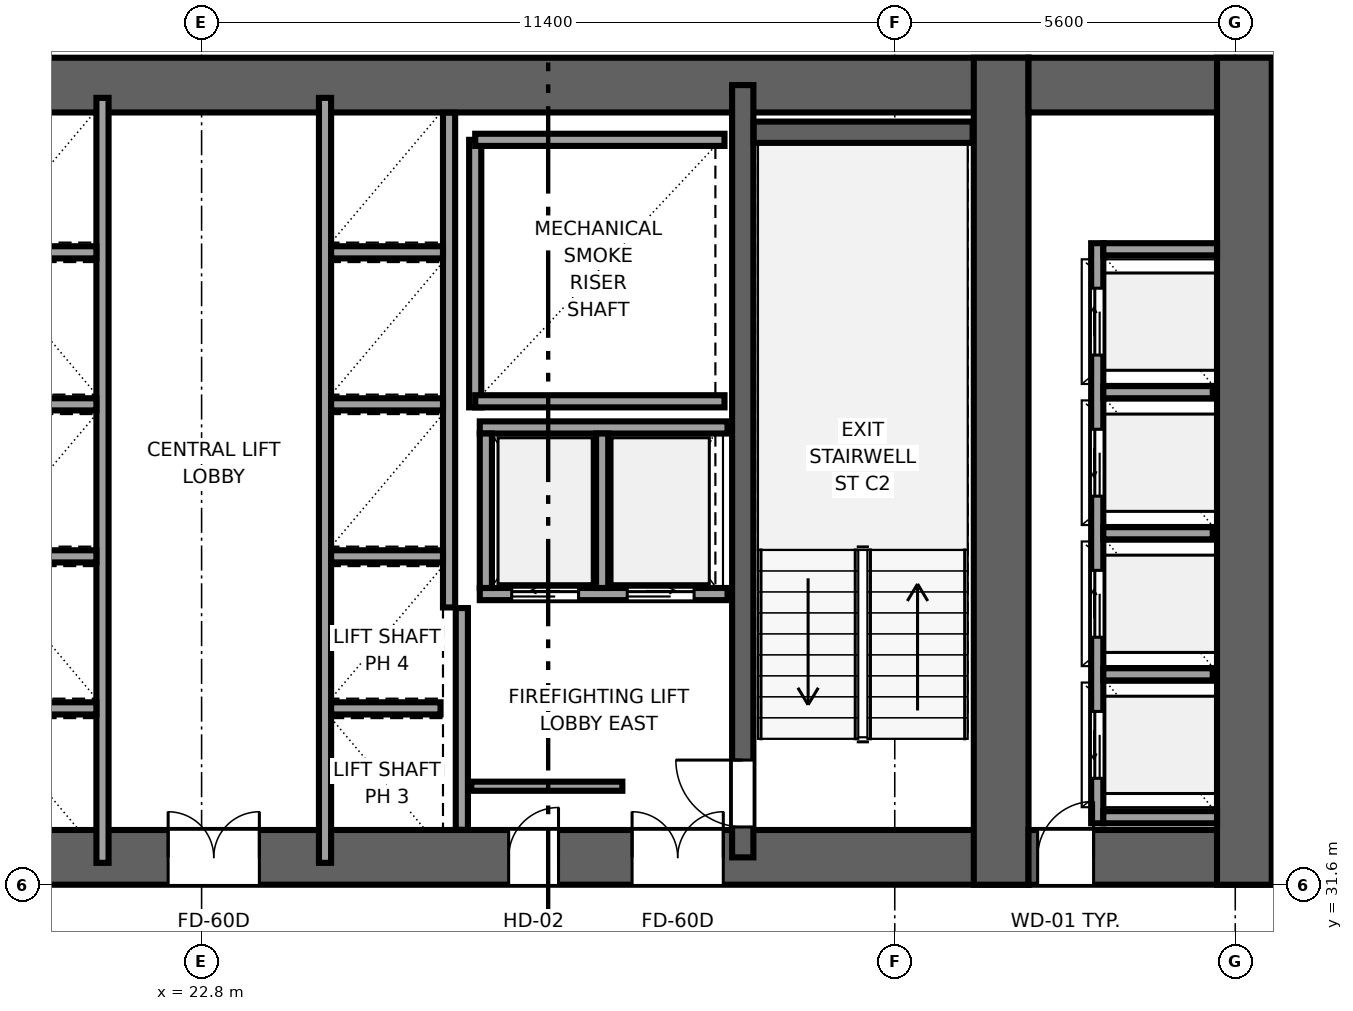
"""IFC4 building model, lengths in metres.
Left out: names, types, materials, properties, quantities, classifications, styles, units other than length and angle.
Written with IfcOpenShell. Run it as: python <this file> out.ifc"""

import sys

from ifc_helpers import new_model, si_unit, direction, frame, frame_2d, origin, place, context, subcontext, project, spatial, rectangle, extrude, source, transform, mapped, element, fill, save


model = new_model("IFC4")
c1 = context("Model", 3, precision=1e-05, world=origin(), true_north=direction((0.0, 1.0)))
c2 = subcontext(c1, "Body", "Model", "MODEL_VIEW")
j1 = project(units=[si_unit("LENGTHUNIT", "METRE"), si_unit("PLANEANGLEUNIT", "RADIAN")], contexts=[c1])
p1 = place(None, origin())
s1 = spatial("IfcSite", under=j1, at=p1, CompositionType="ELEMENT")
p2 = place(p1, origin())
s2 = spatial("IfcBuilding", under=s1, at=p2, CompositionType="ELEMENT")
p3 = place(p2, frame((0.0, 0.0, 71.05)))
s3 = spatial("IfcBuildingStorey", under=s2, at=p3, CompositionType="ELEMENT", Elevation=71.05)
p4 = place(p3, frame((9.6, 32.05, 0.0), z_axis=(0.0, 0.0, 1.0), x_axis=(1.0, 0.0, 0.0)))
e1 = element("IfcWall", 1, at=p4, inside=s3, PredefinedType="SHEAR", context=c2, shape_type="SweptSolid", body=[
    extrude(rectangle(XDim=26.8, YDim=0.9, at=frame_2d((13.4, 0.0))), origin(), (0.0, 0.0, 1.0), 3.55),
])
p5 = place(p4, frame((6.52, 0.0, 0.0), z_axis=(0.0, 0.0, 1.0), x_axis=(-1.0, 0.0, 0.0)))
e2 = element("IfcOpeningElement", 2, at=p5, cuts=e1, PredefinedType="OPENING", context=c2, shape_type="SweptSolid", body=[
    extrude(rectangle(XDim=1.5, YDim=2.04, at=frame_2d((0.75, 1.02))), frame((0.0, 0.46, 0.0), z_axis=(0.0, -1.0, 0.0), x_axis=(1.0, 0.0, 0.0)), (0.0, 0.0, 1.0), 0.92),
])
p6 = place(p4, frame((14.15, 0.0, 0.0), z_axis=(0.0, 0.0, 1.0), x_axis=(-1.0, 0.0, 0.0)))
e3 = element("IfcOpeningElement", 3, at=p6, cuts=e1, PredefinedType="OPENING", context=c2, shape_type="SweptSolid", body=[
    extrude(rectangle(XDim=1.5, YDim=2.04, at=frame_2d((0.75, 1.02))), frame((0.0, 0.46, 0.0), z_axis=(0.0, -1.0, 0.0), x_axis=(1.0, 0.0, 0.0)), (0.0, 0.0, 1.0), 0.92),
])
p7 = place(p4, frame((21.78, 0.0, 0.0), z_axis=(0.0, 0.0, 1.0), x_axis=(-1.0, 0.0, 0.0)))
e4 = element("IfcOpeningElement", 4, at=p7, cuts=e1, PredefinedType="OPENING", context=c2, shape_type="SweptSolid", body=[
    extrude(rectangle(XDim=1.5, YDim=2.04, at=frame_2d((0.75, 1.02))), frame((0.0, 0.46, 0.0), z_axis=(0.0, -1.0, 0.0), x_axis=(1.0, 0.0, 0.0)), (0.0, 0.0, 1.0), 0.92),
])
p8 = place(p4, frame((8.57, 0.0, 0.0), z_axis=(0.0, 0.0, 1.0), x_axis=(-1.0, 0.0, 0.0)))
e5 = element("IfcOpeningElement", 5, at=p8, cuts=e1, PredefinedType="OPENING", context=c2, shape_type="SweptSolid", body=[
    extrude(rectangle(XDim=0.82, YDim=2.01, at=frame_2d((0.41, 1.005))), frame((0.0, 0.46, 0.0), z_axis=(0.0, -1.0, 0.0), x_axis=(1.0, 0.0, 0.0)), (0.0, 0.0, 1.0), 0.92),
])
p9 = place(p4, frame((19.07, 0.0, 0.0), z_axis=(0.0, 0.0, 1.0), x_axis=(-1.0, 0.0, 0.0)))
e6 = element("IfcOpeningElement", 6, at=p9, cuts=e1, PredefinedType="OPENING", context=c2, shape_type="SweptSolid", body=[
    extrude(rectangle(XDim=0.82, YDim=2.01, at=frame_2d((0.41, 1.005))), frame((0.0, 0.46, 0.0), z_axis=(0.0, -1.0, 0.0), x_axis=(1.0, 0.0, 0.0)), (0.0, 0.0, 1.0), 0.92),
])
p10 = place(p3, frame((9.6, 44.75, 0.0), z_axis=(0.0, 0.0, 1.0), x_axis=(1.0, 0.0, 0.0)))
e7 = element("IfcWall", 7, at=p10, inside=s3, PredefinedType="SHEAR", context=c2, shape_type="SweptSolid", body=[
    extrude(rectangle(XDim=26.8, YDim=0.9, at=frame_2d((13.4, 0.0))), origin(), (0.0, 0.0, 1.0), 3.55),
])
p11 = place(p3, frame((35.95, 31.6, 0.0), z_axis=(0.0, 0.0, 1.0), x_axis=(0.0, 1.0, 0.0)))
e8 = element("IfcWall", 8, at=p11, inside=s3, PredefinedType="SHEAR", context=c2, shape_type="SweptSolid", body=[
    extrude(rectangle(XDim=13.6, YDim=0.9, at=frame_2d((6.8, 0.0))), origin(), (0.0, 0.0, 1.0), 3.55),
])
p12 = place(p3, frame((31.7, 32.05, 0.0), z_axis=(0.0, 0.0, 1.0), x_axis=(0.0, 1.0, 0.0)))
e9 = element("IfcWall", 9, at=p12, inside=s3, PredefinedType="SHEAR", context=c2, shape_type="SweptSolid", body=[
    extrude(rectangle(XDim=12.7, YDim=0.35, at=frame_2d((6.35, 0.0))), origin(), (0.0, 0.0, 1.0), 3.55),
])
p13 = place(p12, frame((1.6, 0.0, 0.0), z_axis=(0.0, 0.0, 1.0), x_axis=(-1.0, 0.0, 0.0)))
e10 = element("IfcOpeningElement", 10, at=p13, cuts=e9, PredefinedType="OPENING", context=c2, shape_type="SweptSolid", body=[
    extrude(rectangle(XDim=1.1, YDim=2.12, at=frame_2d((0.55, 1.06))), frame((0.0, 0.185, 0.0), z_axis=(0.0, -1.0, 0.0), x_axis=(1.0, 0.0, 0.0)), (0.0, 0.0, 1.0), 0.37),
])
p14 = place(p3, frame((36.4, 32.05, 0.0), z_axis=(0.0, 0.0, 1.0), x_axis=(1.0, 0.0, 0.0)))
e11 = element("IfcWall", 11, at=p14, inside=s3, PredefinedType="SHEAR", context=c2, shape_type="SweptSolid", body=[
    extrude(rectangle(XDim=4.0, YDim=0.9, at=frame_2d((2.0, 0.0))), origin(), (0.0, 0.0, 1.0), 3.55),
])
p15 = place(p14, frame((1.07, 0.0, 0.0), z_axis=(0.0, 0.0, 1.0), x_axis=(-1.0, 0.0, 0.0)))
e12 = element("IfcOpeningElement", 12, at=p15, cuts=e11, PredefinedType="OPENING", context=c2, shape_type="SweptSolid", body=[
    extrude(rectangle(XDim=0.92, YDim=2.01, at=frame_2d((0.46, 1.005))), frame((0.0, 0.46, 0.0), z_axis=(0.0, -1.0, 0.0), x_axis=(1.0, 0.0, 0.0)), (0.0, 0.0, 1.0), 0.92),
])
p16 = place(p3, frame((36.4, 44.75, 0.0), z_axis=(0.0, 0.0, 1.0), x_axis=(1.0, 0.0, 0.0)))
e13 = element("IfcWall", 13, at=p16, inside=s3, PredefinedType="SHEAR", context=c2, shape_type="SweptSolid", body=[
    extrude(rectangle(XDim=4.0, YDim=0.9, at=frame_2d((2.0, 0.0))), origin(), (0.0, 0.0, 1.0), 3.55),
])
p17 = place(p3, frame((39.95, 31.6, 0.0), z_axis=(0.0, 0.0, 1.0), x_axis=(0.0, 1.0, 0.0)))
e14 = element("IfcWall", 14, at=p17, inside=s3, PredefinedType="SHEAR", context=c2, shape_type="SweptSolid", body=[
    extrude(rectangle(XDim=13.6, YDim=0.9, at=frame_2d((6.8, 0.0))), origin(), (0.0, 0.0, 1.0), 3.55),
])
p18 = place(p3, frame((31.88, 43.975, 0.0), z_axis=(0.0, 0.0, 1.0), x_axis=(1.0, 0.0, 0.0)))
e15 = element("IfcWall", 15, at=p18, inside=s3, PredefinedType="SHEAR", context=c2, shape_type="SweptSolid", body=[
    extrude(rectangle(XDim=3.6, YDim=0.35, at=frame_2d((1.8, 0.0))), origin(), (0.0, 0.0, 1.0), 3.55),
])
p19 = place(p3, frame((27.3, 39.45, 0.0), z_axis=(0.0, 0.0, 1.0), x_axis=(0.0, 1.0, 0.0)))
e16 = element("IfcWall", 16, at=p19, inside=s3, PredefinedType="SOLIDWALL", context=c2, shape_type="SweptSolid", body=[
    extrude(rectangle(XDim=4.4, YDim=0.2, at=frame_2d((2.2, 0.0))), origin(), (0.0, 0.0, 1.0), 3.37),
])
for number, where, z_axis, x_axis in (
    (17, (27.3, 39.55, 0.0), (0.0, 0.0, 1.0), (1.0, 0.0, 0.0)),
    (18, (27.3, 43.85, 0.0), (0.0, 0.0, 1.0), (1.0, 0.0, 0.0)),
):
    element("IfcWall", number, at=place(p3, frame(where, z_axis=z_axis, x_axis=x_axis)), inside=s3, PredefinedType="SOLIDWALL", context=c2, shape_type="SweptSolid", body=[
        extrude(rectangle(XDim=4.1, YDim=0.2, at=frame_2d((2.05, 0.0))), origin(), (0.0, 0.0, 1.0), 3.37),
    ])
p20 = place(p3, frame((27.08, 32.504, 0.0), z_axis=(0.0, 0.0, 1.0), x_axis=(0.0, 1.0, 0.0)))
e19 = element("IfcWall", 19, at=p20, inside=s3, PredefinedType="SOLIDWALL", context=c2, shape_type="SweptSolid", body=[
    extrude(rectangle(XDim=3.646, YDim=0.2, at=frame_2d((1.823, 0.0))), origin(), (0.0, 0.0, 1.0), 3.37),
])
p21 = place(p3, frame((21.17, 31.96, 0.0), z_axis=(0.0, 0.0, 1.0), x_axis=(0.0, 1.0, 0.0)))
e20 = element("IfcWall", 20, at=p21, inside=s3, PredefinedType="SOLIDWALL", context=c2, shape_type="SweptSolid", body=[
    extrude(rectangle(XDim=12.58, YDim=0.2, at=frame_2d((6.29, 0.0))), origin(), (0.0, 0.0, 1.0), 3.37),
])
p22 = place(p3, frame((19.27, 34.5, 0.0), z_axis=(0.0, 0.0, 1.0), x_axis=(1.0, 0.0, 0.0)))
e21 = element("IfcWall", 21, at=p22, inside=s3, PredefinedType="SOLIDWALL", context=c2, shape_type="SweptSolid", body=[
    extrude(rectangle(XDim=1.8, YDim=0.2, at=frame_2d((0.9, 0.0))), origin(), (0.0, 0.0, 1.0), 3.37),
])
for number, where, z_axis, x_axis in (
    (22, (19.23, 37.0, 0.0), (0.0, 0.0, 1.0), (1.0, 0.0, 0.0)),
    (23, (19.23, 39.5, 0.0), (0.0, 0.0, 1.0), (1.0, 0.0, 0.0)),
    (24, (19.23, 42.0, 0.0), (0.0, 0.0, 1.0), (1.0, 0.0, 0.0)),
):
    element("IfcWall", number, at=place(p3, frame(where, z_axis=z_axis, x_axis=x_axis)), inside=s3, PredefinedType="SOLIDWALL", context=c2, shape_type="SweptSolid", body=[
        extrude(rectangle(XDim=1.84, YDim=0.2, at=frame_2d((0.92, 0.0))), origin(), (0.0, 0.0, 1.0), 3.37),
    ])
p23 = place(p3, frame((27.375, 36.38, 0.0), z_axis=(0.0, 0.0, 1.0), x_axis=(1.0, 0.0, 0.0)))
e25 = element("IfcWall", 25, at=p23, inside=s3, PredefinedType="SOLIDWALL", context=c2, shape_type="SweptSolid", body=[
    extrude(rectangle(XDim=4.075, YDim=0.2, at=frame_2d((2.038, 0.0))), origin(), (0.0, 0.0, 1.0), 3.37),
])
p24 = place(p23, frame((0.525, 0.0, 0.0)))
e26 = element("IfcOpeningElement", 26, at=p24, cuts=e25, PredefinedType="OPENING", context=c2, shape_type="SweptSolid", body=[
    extrude(rectangle(XDim=1.1, YDim=2.12, at=frame_2d((0.55, 1.06))), frame((0.0, 0.11, 0.0), z_axis=(0.0, -1.0, 0.0), x_axis=(1.0, 0.0, 0.0)), (0.0, 0.0, 1.0), 0.22),
])
p25 = place(p23, frame((2.425, 0.0, 0.0)))
e27 = element("IfcOpeningElement", 27, at=p25, cuts=e25, PredefinedType="OPENING", context=c2, shape_type="SweptSolid", body=[
    extrude(rectangle(XDim=1.1, YDim=2.12, at=frame_2d((0.55, 1.06))), frame((0.0, 0.11, 0.0), z_axis=(0.0, -1.0, 0.0), x_axis=(1.0, 0.0, 0.0)), (0.0, 0.0, 1.0), 0.22),
])
p26 = place(p3, frame((27.375, 39.12, 0.0), z_axis=(0.0, 0.0, 1.0), x_axis=(1.0, 0.0, 0.0)))
e28 = element("IfcWall", 28, at=p26, inside=s3, PredefinedType="SOLIDWALL", context=c2, shape_type="SweptSolid", body=[
    extrude(rectangle(XDim=4.075, YDim=0.2, at=frame_2d((2.038, 0.0))), origin(), (0.0, 0.0, 1.0), 3.37),
])
for number, where, z_axis, x_axis in (
    (29, (27.475, 36.48, 0.0), (0.0, 0.0, 1.0), (0.0, 1.0, 0.0)),
    (30, (29.387, 36.48, 0.0), (0.0, 0.0, 1.0), (0.0, 1.0, 0.0)),
):
    element("IfcWall", number, at=place(p3, frame(where, z_axis=z_axis, x_axis=x_axis)), inside=s3, PredefinedType="SOLIDWALL", context=c2, shape_type="SweptSolid", body=[
        extrude(rectangle(XDim=2.54, YDim=0.2, at=frame_2d((1.27, 0.0))), origin(), (0.0, 0.0, 1.0), 3.37),
    ])
p27 = place(p3, frame((24.83, 31.96, 0.0), z_axis=(0.0, 0.0, 1.0), x_axis=(0.0, 1.0, 0.0)))
e31 = element("IfcWall", 31, at=p27, inside=s3, PredefinedType="SOLIDWALL", context=c2, shape_type="SweptSolid", body=[
    extrude(rectangle(XDim=12.58, YDim=0.2, at=frame_2d((6.29, 0.0))), origin(), (0.0, 0.0, 1.0), 3.37),
])
p28 = place(p3, frame((26.87, 36.16, 0.0), z_axis=(0.0, 0.0, 1.0), x_axis=(0.0, 1.0, 0.0)))
e32 = element("IfcWall", 32, at=p28, inside=s3, PredefinedType="SOLIDWALL", context=c2, shape_type="SweptSolid", body=[
    extrude(rectangle(XDim=8.136, YDim=0.2, at=frame_2d((4.068, 0.0))), origin(), (0.0, 0.0, 1.0), 3.37),
])
p29 = place(p3, frame((24.93, 34.5, 0.0), z_axis=(0.0, 0.0, 1.0), x_axis=(1.0, 0.0, 0.0)))
e33 = element("IfcWall", 33, at=p29, inside=s3, PredefinedType="SOLIDWALL", context=c2, shape_type="SweptSolid", body=[
    extrude(rectangle(XDim=1.8, YDim=0.2, at=frame_2d((0.9, 0.0))), origin(), (0.0, 0.0, 1.0), 3.37),
])
for number, where, z_axis, x_axis in (
    (34, (24.93, 37.0, 0.0), (0.0, 0.0, 1.0), (1.0, 0.0, 0.0)),
    (35, (24.93, 39.5, 0.0), (0.0, 0.0, 1.0), (1.0, 0.0, 0.0)),
    (36, (24.93, 42.0, 0.0), (0.0, 0.0, 1.0), (1.0, 0.0, 0.0)),
):
    element("IfcWall", number, at=place(p3, frame(where, z_axis=z_axis, x_axis=x_axis)), inside=s3, PredefinedType="SOLIDWALL", context=c2, shape_type="SweptSolid", body=[
        extrude(rectangle(XDim=1.84, YDim=0.2, at=frame_2d((0.92, 0.0))), origin(), (0.0, 0.0, 1.0), 3.37),
    ])
p30 = place(p3, frame((37.53, 32.61, 0.0), z_axis=(0.0, 0.0, 1.0), x_axis=(0.0, 1.0, 0.0)))
e37 = element("IfcWall", 37, at=p30, inside=s3, PredefinedType="SOLIDWALL", context=c2, shape_type="SweptSolid", body=[
    extrude(rectangle(XDim=9.54, YDim=0.2, at=frame_2d((4.77, 0.0))), origin(), (0.0, 0.0, 1.0), 3.37),
])
p31 = place(p30, frame((0.74, 0.0, 0.0)))
e38 = element("IfcOpeningElement", 38, at=p31, cuts=e37, PredefinedType="OPENING", context=c2, shape_type="SweptSolid", body=[
    extrude(rectangle(XDim=1.1, YDim=2.12, at=frame_2d((0.55, 1.06))), frame((0.0, 0.11, 0.0), z_axis=(0.0, -1.0, 0.0), x_axis=(1.0, 0.0, 0.0)), (0.0, 0.0, 1.0), 0.22),
])
p32 = place(p30, frame((3.06, 0.0, 0.0)))
e39 = element("IfcOpeningElement", 39, at=p32, cuts=e37, PredefinedType="OPENING", context=c2, shape_type="SweptSolid", body=[
    extrude(rectangle(XDim=1.1, YDim=2.12, at=frame_2d((0.55, 1.06))), frame((0.0, 0.11, 0.0), z_axis=(0.0, -1.0, 0.0), x_axis=(1.0, 0.0, 0.0)), (0.0, 0.0, 1.0), 0.22),
])
p33 = place(p30, frame((5.38, 0.0, 0.0)))
e40 = element("IfcOpeningElement", 40, at=p33, cuts=e37, PredefinedType="OPENING", context=c2, shape_type="SweptSolid", body=[
    extrude(rectangle(XDim=1.1, YDim=2.12, at=frame_2d((0.55, 1.06))), frame((0.0, 0.11, 0.0), z_axis=(0.0, -1.0, 0.0), x_axis=(1.0, 0.0, 0.0)), (0.0, 0.0, 1.0), 0.22),
])
p34 = place(p30, frame((7.7, 0.0, 0.0)))
e41 = element("IfcOpeningElement", 41, at=p34, cuts=e37, PredefinedType="OPENING", context=c2, shape_type="SweptSolid", body=[
    extrude(rectangle(XDim=1.1, YDim=2.12, at=frame_2d((0.55, 1.06))), frame((0.0, 0.11, 0.0), z_axis=(0.0, -1.0, 0.0), x_axis=(1.0, 0.0, 0.0)), (0.0, 0.0, 1.0), 0.22),
])
for number, where, z_axis, x_axis in (
    (42, (37.63, 32.71, 0.0), (0.0, 0.0, 1.0), (1.0, 0.0, 0.0)),
    (43, (37.63, 42.05, 0.0), (0.0, 0.0, 1.0), (1.0, 0.0, 0.0)),
):
    element("IfcWall", number, at=place(p3, frame(where, z_axis=z_axis, x_axis=x_axis)), inside=s3, PredefinedType="SOLIDWALL", context=c2, shape_type="SweptSolid", body=[
        extrude(rectangle(XDim=1.87, YDim=0.2, at=frame_2d((0.935, 0.0))), origin(), (0.0, 0.0, 1.0), 3.37),
    ])
for number, where, z_axis, x_axis in (
    (44, (37.63, 35.06, 0.0), (0.0, 0.0, 1.0), (1.0, 0.0, 0.0)),
    (45, (37.63, 37.38, 0.0), (0.0, 0.0, 1.0), (1.0, 0.0, 0.0)),
    (46, (37.63, 39.7, 0.0), (0.0, 0.0, 1.0), (1.0, 0.0, 0.0)),
):
    element("IfcWall", number, at=place(p3, frame(where, z_axis=z_axis, x_axis=x_axis)), inside=s3, PredefinedType="SOLIDWALL", context=c2, shape_type="SweptSolid", body=[
        extrude(rectangle(XDim=1.8, YDim=0.2, at=frame_2d((0.9, 0.0))), origin(), (0.0, 0.0, 1.0), 3.37),
    ])
p35 = place(p3, frame((27.235, 33.22, 0.0), z_axis=(0.0, 0.0, 1.0), x_axis=(1.0, 0.0, 0.0)))
e47 = element("IfcWall", 47, at=p35, inside=s3, PredefinedType="PARTITIONING", context=c2, shape_type="SweptSolid", body=[
    extrude(rectangle(XDim=2.485, YDim=0.15, at=frame_2d((1.242, 0.0))), origin(), (0.0, 0.0, 1.0), 3.37),
])
m1 = source(origin(), c2, "Body", "SweptSolid", [
    extrude(rectangle(XDim=1.1, YDim=2.12, at=frame_2d((0.55, 1.06))), frame((0.0, 0.025, 0.0), z_axis=(0.0, -1.0, 0.0), x_axis=(1.0, 0.0, 0.0)), (0.0, 0.0, 1.0), 0.05),
])
p36 = place(p13, origin())
e48 = element("IfcDoor", 48, at=p36, inside=s3, OperationType="SINGLE_SWING_RIGHT", PredefinedType="DOOR", context=c2, shape_type="MappedRepresentation", body=[
    mapped(m1, transform((0.0, 0.0, 0.0), x_axis=(1.0, 0.0, 0.0), y_axis=(0.0, 1.0, 0.0), z_axis=(0.0, 0.0, 1.0), scale=1.0)),
])
fill(e10, e48)
m2 = source(origin(), c2, "Body", "SweptSolid", [
    extrude(rectangle(XDim=1.5, YDim=2.04, at=frame_2d((0.75, 1.02))), frame((0.0, 0.025, 0.0), z_axis=(0.0, -1.0, 0.0), x_axis=(1.0, 0.0, 0.0)), (0.0, 0.0, 1.0), 0.05),
])
p37 = place(p6, origin())
e49 = element("IfcDoor", 49, at=p37, inside=s3, OperationType="DOUBLE_DOOR_SINGLE_SWING", PredefinedType="DOOR", context=c2, shape_type="MappedRepresentation", body=[
    mapped(m2, transform((0.0, 0.0, 0.0), x_axis=(1.0, 0.0, 0.0), y_axis=(0.0, 1.0, 0.0), z_axis=(0.0, 0.0, 1.0), scale=1.0)),
])
fill(e3, e49)
p38 = place(p7, origin())
e50 = element("IfcDoor", 50, at=p38, inside=s3, OperationType="DOUBLE_DOOR_SINGLE_SWING", PredefinedType="DOOR", context=c2, shape_type="MappedRepresentation", body=[
    mapped(m2, transform((0.0, 0.0, 0.0), x_axis=(1.0, 0.0, 0.0), y_axis=(0.0, 1.0, 0.0), z_axis=(0.0, 0.0, 1.0), scale=1.0)),
])
fill(e4, e50)
m3 = source(origin(), c2, "Body", "SweptSolid", [
    extrude(rectangle(XDim=0.82, YDim=2.01, at=frame_2d((0.41, 1.005))), frame((0.0, 0.025, 0.0), z_axis=(0.0, -1.0, 0.0), x_axis=(1.0, 0.0, 0.0)), (0.0, 0.0, 1.0), 0.05),
])
p39 = place(p9, origin())
e51 = element("IfcDoor", 51, at=p39, inside=s3, OperationType="SINGLE_SWING_RIGHT", PredefinedType="DOOR", context=c2, shape_type="MappedRepresentation", body=[
    mapped(m3, transform((0.0, 0.0, 0.0), x_axis=(1.0, 0.0, 0.0), y_axis=(0.0, 1.0, 0.0), z_axis=(0.0, 0.0, 1.0), scale=1.0)),
])
fill(e6, e51)
m4 = source(origin(), c2, "Body", "SweptSolid", [
    extrude(rectangle(XDim=0.92, YDim=2.01, at=frame_2d((0.46, 1.005))), frame((0.0, 0.025, 0.0), z_axis=(0.0, -1.0, 0.0), x_axis=(1.0, 0.0, 0.0)), (0.0, 0.0, 1.0), 0.05),
])
p40 = place(p15, origin())
e52 = element("IfcDoor", 52, at=p40, inside=s3, OperationType="SINGLE_SWING_RIGHT", PredefinedType="DOOR", context=c2, shape_type="MappedRepresentation", body=[
    mapped(m4, transform((0.0, 0.0, 0.0), x_axis=(1.0, 0.0, 0.0), y_axis=(0.0, 1.0, 0.0), z_axis=(0.0, 0.0, 1.0), scale=1.0)),
])
fill(e12, e52)
m5 = source(origin(), c2, "Body", "SweptSolid", [
    extrude(rectangle(XDim=1.1, YDim=2.12, at=frame_2d((0.55, 1.06))), frame((0.0, 0.025, 0.0), z_axis=(0.0, -1.0, 0.0), x_axis=(1.0, 0.0, 0.0)), (0.0, 0.0, 1.0), 0.05),
])
p41 = place(p24, origin())
e53 = element("IfcDoor", 53, at=p41, inside=s3, OperationType="SLIDING_TO_LEFT", PredefinedType="DOOR", context=c2, shape_type="MappedRepresentation", body=[
    mapped(m5, transform((0.0, 0.0, 0.0), x_axis=(1.0, 0.0, 0.0), y_axis=(0.0, 1.0, 0.0), z_axis=(0.0, 0.0, 1.0), scale=1.0)),
])
fill(e26, e53)
p42 = place(p25, origin())
e54 = element("IfcDoor", 54, at=p42, inside=s3, OperationType="SLIDING_TO_RIGHT", PredefinedType="DOOR", context=c2, shape_type="MappedRepresentation", body=[
    mapped(m5, transform((0.0, 0.0, 0.0), x_axis=(1.0, 0.0, 0.0), y_axis=(0.0, 1.0, 0.0), z_axis=(0.0, 0.0, 1.0), scale=1.0)),
])
fill(e27, e54)
p43 = place(p31, origin())
e55 = element("IfcDoor", 55, at=p43, inside=s3, OperationType="SLIDING_TO_LEFT", PredefinedType="DOOR", context=c2, shape_type="MappedRepresentation", body=[
    mapped(m5, transform((0.0, 0.0, 0.0), x_axis=(1.0, 0.0, 0.0), y_axis=(0.0, 1.0, 0.0), z_axis=(0.0, 0.0, 1.0), scale=1.0)),
])
fill(e38, e55)
p44 = place(p32, origin())
e56 = element("IfcDoor", 56, at=p44, inside=s3, OperationType="SLIDING_TO_RIGHT", PredefinedType="DOOR", context=c2, shape_type="MappedRepresentation", body=[
    mapped(m5, transform((0.0, 0.0, 0.0), x_axis=(1.0, 0.0, 0.0), y_axis=(0.0, 1.0, 0.0), z_axis=(0.0, 0.0, 1.0), scale=1.0)),
])
fill(e39, e56)
p45 = place(p33, origin())
e57 = element("IfcDoor", 57, at=p45, inside=s3, OperationType="SLIDING_TO_LEFT", PredefinedType="DOOR", context=c2, shape_type="MappedRepresentation", body=[
    mapped(m5, transform((0.0, 0.0, 0.0), x_axis=(1.0, 0.0, 0.0), y_axis=(0.0, 1.0, 0.0), z_axis=(0.0, 0.0, 1.0), scale=1.0)),
])
fill(e40, e57)
p46 = place(p34, origin())
e58 = element("IfcDoor", 58, at=p46, inside=s3, OperationType="SLIDING_TO_RIGHT", PredefinedType="DOOR", context=c2, shape_type="MappedRepresentation", body=[
    mapped(m5, transform((0.0, 0.0, 0.0), x_axis=(1.0, 0.0, 0.0), y_axis=(0.0, 1.0, 0.0), z_axis=(0.0, 0.0, 1.0), scale=1.0)),
])
fill(e41, e58)
save(model, sys.argv[1])
